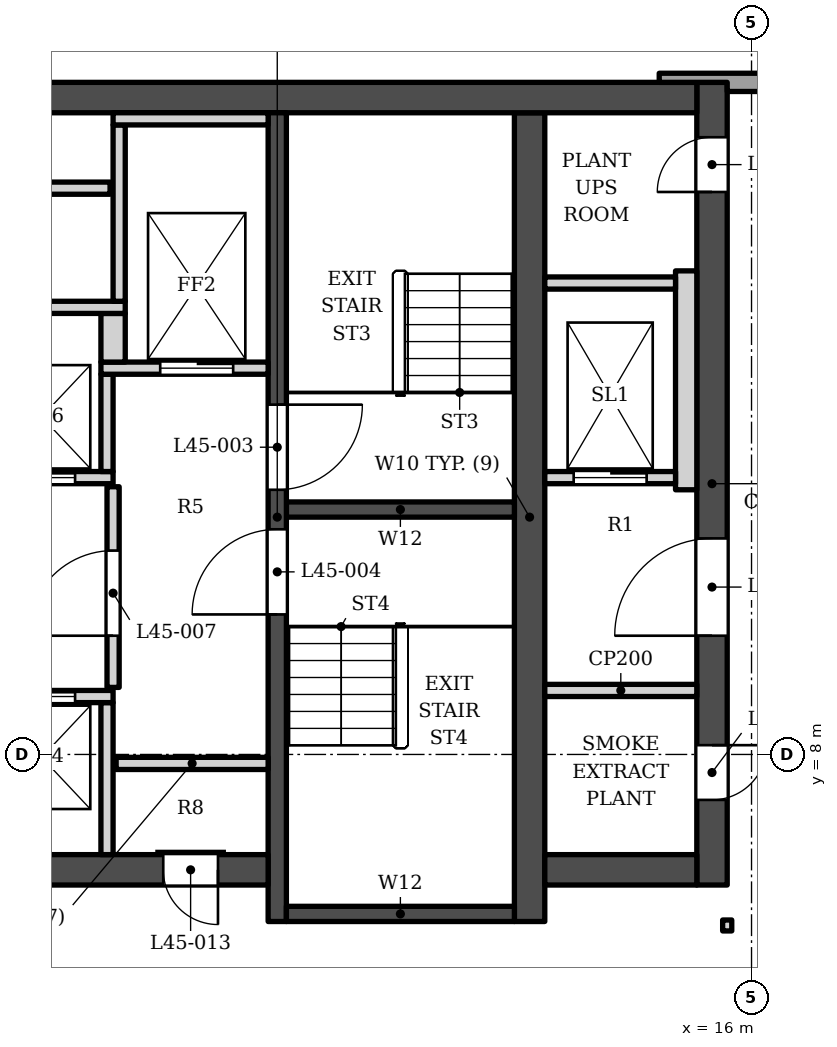
"""IFC4 building model, lengths in metres.
Left out: names, types, materials, properties, quantities, classifications, styles, units other than length and angle.
Written with IfcOpenShell. Run it as: python <this file> out.ifc"""

import sys

from ifc_helpers import new_model, si_unit, direction, frame, frame_2d, origin, place, context, subcontext, project, spatial, polyline, rectangle, outline, extrude, element, fill, save


model = new_model("IFC4")
c1 = context("Model", 3, precision=1e-05, world=origin(), true_north=direction((0.0, 1.0)))
c2 = subcontext(c1, "Body", "Model", "MODEL_VIEW")
j1 = project(units=[si_unit("LENGTHUNIT", "METRE"), si_unit("PLANEANGLEUNIT", "RADIAN")], contexts=[c1])
p1 = place(None, origin())
s1 = spatial("IfcSite", under=j1, at=p1, CompositionType="ELEMENT")
p2 = place(p1, origin())
s2 = spatial("IfcBuilding", under=s1, at=p2, CompositionType="ELEMENT")
p3 = place(p2, frame((0.0, 0.0, 191.4)))
s3 = spatial("IfcBuildingStorey", under=s2, at=p3, CompositionType="ELEMENT", Elevation=191.4)
p4 = place(p3, frame((-15.1, 18.802, 0.0), z_axis=(0.0, 0.0, 1.0), x_axis=(1.0, 0.0, 0.0)))
e1 = element("IfcWall", 1, at=p4, inside=s3, PredefinedType="SHEAR", context=c2, shape_type="SweptSolid", body=[
    extrude(rectangle(XDim=30.2, YDim=0.5, at=frame_2d((15.1, 0.0))), origin(), (0.0, 0.0, 1.0), 5.0),
])
p5 = place(p3, frame((12.35, 5.253, 0.0), z_axis=(0.0, 0.0, 1.0), x_axis=(0.0, 1.0, 0.0)))
e2 = element("IfcWall", 2, at=p5, inside=s3, PredefinedType="SHEAR", context=c2, shape_type="SweptSolid", body=[
    extrude(rectangle(XDim=13.3, YDim=0.5, at=frame_2d((6.65, 0.0))), origin(), (0.0, 0.0, 1.0), 5.0),
])
p6 = place(p3, frame((8.2, 5.253, 0.0), z_axis=(0.0, 0.0, 1.0), x_axis=(0.0, 1.0, 0.0)))
e3 = element("IfcWall", 3, at=p6, inside=s3, PredefinedType="SHEAR", context=c2, shape_type="SweptSolid", body=[
    extrude(rectangle(XDim=13.3, YDim=0.3, at=frame_2d((6.65, 0.0))), origin(), (0.0, 0.0, 1.0), 5.0),
])
p7 = place(p6, frame((7.1, 0.0, 0.0)))
e4 = element("IfcOpeningElement", 4, at=p7, cuts=e3, PredefinedType="OPENING", context=c2, shape_type="SweptSolid", body=[
    extrude(rectangle(XDim=1.4, YDim=2.1, at=frame_2d((0.7, 1.05))), frame((0.0, 0.16, 0.0), z_axis=(0.0, -1.0, 0.0), x_axis=(1.0, 0.0, 0.0)), (0.0, 0.0, 1.0), 0.32),
])
p8 = place(p6, frame((5.05, 0.0, 0.0)))
e5 = element("IfcOpeningElement", 5, at=p8, cuts=e3, PredefinedType="OPENING", context=c2, shape_type="SweptSolid", body=[
    extrude(rectangle(XDim=1.4, YDim=2.1, at=frame_2d((0.7, 1.05))), frame((0.0, 0.16, 0.0), z_axis=(0.0, -1.0, 0.0), x_axis=(1.0, 0.0, 0.0)), (0.0, 0.0, 1.0), 0.32),
])
for number, where, z_axis, x_axis in (
    (6, (8.35, 12.028, 0.0), (0.0, 0.0, 1.0), (1.0, 0.0, 0.0)),
    (7, (8.35, 5.378, 0.0), (0.0, 0.0, 1.0), (1.0, 0.0, 0.0)),
):
    element("IfcWall", number, at=place(p3, frame(where, z_axis=z_axis, x_axis=x_axis)), inside=s3, PredefinedType="SHEAR", context=c2, shape_type="SweptSolid", body=[
        extrude(rectangle(XDim=3.75, YDim=0.25, at=frame_2d((1.875, 0.0))), origin(), (0.0, 0.0, 1.0), 5.0),
    ])
p9 = place(p3, frame((1.0, 6.103, 0.0), z_axis=(0.0, 0.0, 1.0), x_axis=(1.0, 0.0, 0.0)))
e8 = element("IfcWall", 8, at=p9, inside=s3, PredefinedType="SHEAR", context=c2, shape_type="SweptSolid", body=[
    extrude(rectangle(XDim=7.05, YDim=0.5, at=frame_2d((3.525, 0.0))), origin(), (0.0, 0.0, 1.0), 5.0),
])
p10 = place(p9, frame((5.325, 0.0, 0.0)))
e9 = element("IfcOpeningElement", 9, at=p10, cuts=e8, PredefinedType="OPENING", context=c2, shape_type="SweptSolid", body=[
    extrude(rectangle(XDim=0.9, YDim=2.1, at=frame_2d((0.45, 1.05))), frame((0.0, 0.26, 0.0), z_axis=(0.0, -1.0, 0.0), x_axis=(1.0, 0.0, 0.0)), (0.0, 0.0, 1.0), 0.52),
])
p11 = place(p3, frame((12.6, 6.103, 0.0), z_axis=(0.0, 0.0, 1.0), x_axis=(1.0, 0.0, 0.0)))
e10 = element("IfcWall", 10, at=p11, inside=s3, PredefinedType="SHEAR", context=c2, shape_type="SweptSolid", body=[
    extrude(rectangle(XDim=2.5, YDim=0.5, at=frame_2d((1.25, 0.0))), origin(), (0.0, 0.0, 1.0), 5.0),
])
p12 = place(p3, frame((15.35, 5.853, 0.0), z_axis=(0.0, 0.0, 1.0), x_axis=(0.0, 1.0, 0.0)))
e11 = element("IfcWall", 11, at=p12, inside=s3, PredefinedType="SHEAR", context=c2, shape_type="SweptSolid", body=[
    extrude(rectangle(XDim=13.2, YDim=0.5, at=frame_2d((6.6, 0.0))), origin(), (0.0, 0.0, 1.0), 5.0),
])
p13 = place(p12, frame((4.1, 0.0, 0.0)))
e12 = element("IfcOpeningElement", 12, at=p13, cuts=e11, PredefinedType="OPENING", context=c2, shape_type="SweptSolid", body=[
    extrude(rectangle(XDim=1.6, YDim=2.1, at=frame_2d((0.8, 1.05))), frame((0.0, 0.26, 0.0), z_axis=(0.0, -1.0, 0.0), x_axis=(1.0, 0.0, 0.0)), (0.0, 0.0, 1.0), 0.52),
])
p14 = place(p12, frame((1.4, 0.0, 0.0)))
e13 = element("IfcOpeningElement", 13, at=p14, cuts=e11, PredefinedType="OPENING", context=c2, shape_type="SweptSolid", body=[
    extrude(rectangle(XDim=0.9, YDim=2.1, at=frame_2d((0.45, 1.05))), frame((0.0, 0.26, 0.0), z_axis=(0.0, -1.0, 0.0), x_axis=(1.0, 0.0, 0.0)), (0.0, 0.0, 1.0), 0.52),
])
p15 = place(p12, frame((11.397, 0.0, 0.0)))
e14 = element("IfcOpeningElement", 14, at=p15, cuts=e11, PredefinedType="OPENING", context=c2, shape_type="SweptSolid", body=[
    extrude(rectangle(XDim=0.9, YDim=2.1, at=frame_2d((0.45, 1.05))), frame((0.0, 0.26, 0.0), z_axis=(0.0, -1.0, 0.0), x_axis=(1.0, 0.0, 0.0)), (0.0, 0.0, 1.0), 0.52),
])
p16 = place(p3, origin())
e15 = element("IfcWall", 15, at=p16, inside=s3, PredefinedType="ELEMENTEDWALL", context=c2, shape_type="SweptSolid", body=[
    extrude(outline(polyline([(18.082, 19.203), (14.482, 19.203), (14.482, 19.052), (15.6, 19.052), (15.6, 18.903), (18.082, 18.903), (18.082, 19.203)])), origin(), (0.0, 0.0, 1.0), 3.5),
])
for number, where, z_axis, x_axis in (
    (16, (5.4, 6.353, 0.0), (0.0, 0.0, 1.0), (0.0, 1.0, 0.0)),
    (17, (5.55, 7.853, 0.0), (0.0, 0.0, 1.0), (1.0, 0.0, 0.0)),
):
    element("IfcWall", number, at=place(p3, frame(where, z_axis=z_axis, x_axis=x_axis)), inside=s3, PredefinedType="SOLIDWALL", context=c2, shape_type="SweptSolid", body=[
        extrude(rectangle(XDim=2.5, YDim=0.2, at=frame_2d((1.25, 0.0))), origin(), (0.0, 0.0, 1.0), 4.83),
    ])
p17 = place(p3, frame((1.0, 8.953, 0.0), z_axis=(0.0, 0.0, 1.0), x_axis=(1.0, 0.0, 0.0)))
e18 = element("IfcWall", 18, at=p17, inside=s3, PredefinedType="SOLIDWALL", context=c2, shape_type="SweptSolid", body=[
    extrude(rectangle(XDim=4.5, YDim=0.2, at=frame_2d((2.25, 0.0))), origin(), (0.0, 0.0, 1.0), 4.83),
])
p18 = place(p17, frame((0.625, 0.0, 0.0)))
e19 = element("IfcOpeningElement", 19, at=p18, cuts=e18, PredefinedType="OPENING", context=c2, shape_type="SweptSolid", body=[
    extrude(rectangle(XDim=1.1, YDim=2.1, at=frame_2d((0.55, 1.05))), frame((0.0, 0.11, 0.0), z_axis=(0.0, -1.0, 0.0), x_axis=(1.0, 0.0, 0.0)), (0.0, 0.0, 1.0), 0.22),
])
p19 = place(p17, frame((2.775, 0.0, 0.0)))
e20 = element("IfcOpeningElement", 20, at=p19, cuts=e18, PredefinedType="OPENING", context=c2, shape_type="SweptSolid", body=[
    extrude(rectangle(XDim=1.1, YDim=2.1, at=frame_2d((0.55, 1.05))), frame((0.0, 0.11, 0.0), z_axis=(0.0, -1.0, 0.0), x_axis=(1.0, 0.0, 0.0)), (0.0, 0.0, 1.0), 0.22),
])
p20 = place(p3, frame((12.6, 9.052, 0.0), z_axis=(0.0, 0.0, 1.0), x_axis=(1.0, 0.0, 0.0)))
e21 = element("IfcWall", 21, at=p20, inside=s3, PredefinedType="PARTITIONING", context=c2, shape_type="SweptSolid", body=[
    extrude(rectangle(XDim=2.5, YDim=0.2, at=frame_2d((1.25, 0.0))), origin(), (0.0, 0.0, 1.0), 4.83),
])
p21 = place(p3, frame((5.5, 9.103, 0.0), z_axis=(0.0, 0.0, 1.0), x_axis=(0.0, 1.0, 0.0)))
e22 = element("IfcWall", 22, at=p21, inside=s3, PredefinedType="SOLIDWALL", context=c2, shape_type="SweptSolid", body=[
    extrude(rectangle(XDim=3.3, YDim=0.2, at=frame_2d((1.65, 0.0))), origin(), (0.0, 0.0, 1.0), 4.83),
])
p22 = place(p21, frame((0.85, 0.0, 0.0)))
e23 = element("IfcOpeningElement", 23, at=p22, cuts=e22, PredefinedType="OPENING", context=c2, shape_type="SweptSolid", body=[
    extrude(rectangle(XDim=1.4, YDim=2.1, at=frame_2d((0.7, 1.05))), frame((0.0, 0.11, 0.0), z_axis=(0.0, -1.0, 0.0), x_axis=(1.0, 0.0, 0.0)), (0.0, 0.0, 1.0), 0.22),
])
p23 = place(p3, frame((14.925, 12.353, 0.0), z_axis=(0.0, 0.0, 1.0), x_axis=(0.0, 1.0, 0.0)))
e24 = element("IfcWall", 24, at=p23, inside=s3, PredefinedType="SOLIDWALL", context=c2, shape_type="SweptSolid", body=[
    extrude(rectangle(XDim=3.6, YDim=0.35, at=frame_2d((1.8, 0.0))), origin(), (0.0, 0.0, 1.0), 4.83),
])
p24 = place(p3, frame((-1.5, 12.552, 0.0), z_axis=(0.0, 0.0, 1.0), x_axis=(1.0, 0.0, 0.0)))
e25 = element("IfcWall", 25, at=p24, inside=s3, PredefinedType="SOLIDWALL", context=c2, shape_type="SweptSolid", body=[
    extrude(rectangle(XDim=7.0, YDim=0.2, at=frame_2d((3.5, 0.0))), origin(), (0.0, 0.0, 1.0), 4.83),
])
p25 = place(p24, frame((3.075, 0.0, 0.0)))
e26 = element("IfcOpeningElement", 26, at=p25, cuts=e25, PredefinedType="OPENING", context=c2, shape_type="SweptSolid", body=[
    extrude(rectangle(XDim=1.1, YDim=2.1, at=frame_2d((0.55, 1.05))), frame((0.0, 0.11, 0.0), z_axis=(0.0, -1.0, 0.0), x_axis=(1.0, 0.0, 0.0)), (0.0, 0.0, 1.0), 0.22),
])
p26 = place(p24, frame((5.275, 0.0, 0.0)))
e27 = element("IfcOpeningElement", 27, at=p26, cuts=e25, PredefinedType="OPENING", context=c2, shape_type="SweptSolid", body=[
    extrude(rectangle(XDim=1.1, YDim=2.1, at=frame_2d((0.55, 1.05))), frame((0.0, 0.11, 0.0), z_axis=(0.0, -1.0, 0.0), x_axis=(1.0, 0.0, 0.0)), (0.0, 0.0, 1.0), 0.22),
])
p27 = place(p3, frame((12.6, 12.552, 0.0), z_axis=(0.0, 0.0, 1.0), x_axis=(1.0, 0.0, 0.0)))
e28 = element("IfcWall", 28, at=p27, inside=s3, PredefinedType="SOLIDWALL", context=c2, shape_type="SweptSolid", body=[
    extrude(rectangle(XDim=2.15, YDim=0.2, at=frame_2d((1.075, 0.0))), origin(), (0.0, 0.0, 1.0), 4.83),
])
p28 = place(p27, frame((0.475, 0.0, 0.0)))
e29 = element("IfcOpeningElement", 29, at=p28, cuts=e28, PredefinedType="OPENING", context=c2, shape_type="SweptSolid", body=[
    extrude(rectangle(XDim=1.2, YDim=2.1, at=frame_2d((0.6, 1.05))), frame((0.0, 0.11, 0.0), z_axis=(0.0, -1.0, 0.0), x_axis=(1.0, 0.0, 0.0)), (0.0, 0.0, 1.0), 0.22),
])
p29 = place(p3, frame((5.4, 12.653, 0.0), z_axis=(0.0, 0.0, 1.0), x_axis=(0.0, 1.0, 0.0)))
e30 = element("IfcWall", 30, at=p29, inside=s3, PredefinedType="SOLIDWALL", context=c2, shape_type="SweptSolid", body=[
    extrude(rectangle(XDim=1.6, YDim=0.2, at=frame_2d((0.8, 0.0))), origin(), (0.0, 0.0, 1.0), 4.83),
])
p30 = place(p3, frame((5.3, 14.353, 0.0), z_axis=(0.0, 0.0, 1.0), x_axis=(1.0, 0.0, 0.0)))
e31 = element("IfcWall", 31, at=p30, inside=s3, PredefinedType="SOLIDWALL", context=c2, shape_type="SweptSolid", body=[
    extrude(rectangle(XDim=2.75, YDim=0.2, at=frame_2d((1.375, 0.0))), origin(), (0.0, 0.0, 1.0), 4.83),
])
p31 = place(p30, frame((0.975, 0.0, 0.0)))
e32 = element("IfcOpeningElement", 32, at=p31, cuts=e31, PredefinedType="OPENING", context=c2, shape_type="SweptSolid", body=[
    extrude(rectangle(XDim=1.2, YDim=2.1, at=frame_2d((0.6, 1.05))), frame((0.0, 0.11, 0.0), z_axis=(0.0, -1.0, 0.0), x_axis=(1.0, 0.0, 0.0)), (0.0, 0.0, 1.0), 0.22),
])
p32 = place(p3, frame((5.5, 14.453, 0.0), z_axis=(0.0, 0.0, 1.0), x_axis=(0.0, 1.0, 0.0)))
e33 = element("IfcWall", 33, at=p32, inside=s3, PredefinedType="SOLIDWALL", context=c2, shape_type="SweptSolid", body=[
    extrude(rectangle(XDim=0.8, YDim=0.4, at=frame_2d((0.4, 0.0))), origin(), (0.0, 0.0, 1.0), 4.83),
])
p33 = place(p3, frame((-1.5, 15.353, 0.0), z_axis=(0.0, 0.0, 1.0), x_axis=(1.0, 0.0, 0.0)))
e34 = element("IfcWall", 34, at=p33, inside=s3, PredefinedType="SOLIDWALL", context=c2, shape_type="SweptSolid", body=[
    extrude(rectangle(XDim=7.2, YDim=0.2, at=frame_2d((3.6, 0.0))), origin(), (0.0, 0.0, 1.0), 4.83),
])
p34 = place(p3, frame((5.6, 15.453, 0.0), z_axis=(0.0, 0.0, 1.0), x_axis=(0.0, 1.0, 0.0)))
e35 = element("IfcWall", 35, at=p34, inside=s3, PredefinedType="SOLIDWALL", context=c2, shape_type="SweptSolid", body=[
    extrude(rectangle(XDim=2.9, YDim=0.2, at=frame_2d((1.45, 0.0))), origin(), (0.0, 0.0, 1.0), 4.83),
])
p35 = place(p3, frame((12.6, 15.753, 0.0), z_axis=(0.0, 0.0, 1.0), x_axis=(1.0, 0.0, 0.0)))
e36 = element("IfcWall", 36, at=p35, inside=s3, PredefinedType="SOLIDWALL", context=c2, shape_type="SweptSolid", body=[
    extrude(rectangle(XDim=2.15, YDim=0.2, at=frame_2d((1.075, 0.0))), origin(), (0.0, 0.0, 1.0), 4.83),
])
p36 = place(p3, frame((-1.4, 17.312, 0.0), z_axis=(0.0, 0.0, 1.0), x_axis=(1.0, 0.0, 0.0)))
e37 = element("IfcWall", 37, at=p36, inside=s3, PredefinedType="SOLIDWALL", context=c2, shape_type="SweptSolid", body=[
    extrude(rectangle(XDim=6.85, YDim=0.2, at=frame_2d((3.425, 0.0))), origin(), (0.0, 0.0, 1.0), 4.83),
])
p37 = place(p3, frame((5.5, 18.453, 0.0), z_axis=(0.0, 0.0, 1.0), x_axis=(1.0, 0.0, 0.0)))
e38 = element("IfcWall", 38, at=p37, inside=s3, PredefinedType="SOLIDWALL", context=c2, shape_type="SweptSolid", body=[
    extrude(rectangle(XDim=2.55, YDim=0.2, at=frame_2d((1.275, 0.0))), origin(), (0.0, 0.0, 1.0), 4.83),
])
p38 = place(p3, frame((15.6, 5.098, 0.0), z_axis=(0.0, 0.0, 1.0), x_axis=(0.0, 1.0, 0.0)))
e39 = element("IfcWall", 39, at=p38, inside=s3, PredefinedType="PARTITIONING", context=c2, shape_type="SweptSolid", body=[
    extrude(rectangle(XDim=0.18, YDim=0.15, at=frame_2d((0.09, 0.0))), origin(), (0.0, 0.0, 1.0), 4.83),
])
p39 = place(p19, origin())
e40 = element("IfcDoor", 40, at=p39, inside=s3, OperationType="DOUBLE_DOOR_SLIDING", PredefinedType="DOOR", context=c2, shape_type="SweptSolid", body=[
    extrude(rectangle(XDim=1.1, YDim=2.1, at=frame_2d((0.55, 1.05))), frame((0.0, 0.025, 0.0), z_axis=(0.0, -1.0, 0.0), x_axis=(1.0, 0.0, 0.0)), (0.0, 0.0, 1.0), 0.05),
])
fill(e20, e40)
p40 = place(p26, origin())
e41 = element("IfcDoor", 41, at=p40, inside=s3, OperationType="DOUBLE_DOOR_SLIDING", PredefinedType="DOOR", context=c2, shape_type="SweptSolid", body=[
    extrude(rectangle(XDim=1.1, YDim=2.1, at=frame_2d((0.55, 1.05))), frame((0.0, 0.025, 0.0), z_axis=(0.0, -1.0, 0.0), x_axis=(1.0, 0.0, 0.0)), (0.0, 0.0, 1.0), 0.05),
])
fill(e27, e41)
p41 = place(p31, origin())
e42 = element("IfcDoor", 42, at=p41, inside=s3, OperationType="DOUBLE_DOOR_SLIDING", PredefinedType="DOOR", context=c2, shape_type="SweptSolid", body=[
    extrude(rectangle(XDim=1.2, YDim=2.1, at=frame_2d((0.6, 1.05))), frame((0.0, 0.025, 0.0), z_axis=(0.0, -1.0, 0.0), x_axis=(1.0, 0.0, 0.0)), (0.0, 0.0, 1.0), 0.05),
])
fill(e32, e42)
p42 = place(p28, origin())
e43 = element("IfcDoor", 43, at=p42, inside=s3, OperationType="DOUBLE_DOOR_SLIDING", PredefinedType="DOOR", context=c2, shape_type="SweptSolid", body=[
    extrude(rectangle(XDim=1.2, YDim=2.1, at=frame_2d((0.6, 1.05))), frame((0.0, 0.025, 0.0), z_axis=(0.0, -1.0, 0.0), x_axis=(1.0, 0.0, 0.0)), (0.0, 0.0, 1.0), 0.05),
])
fill(e29, e43)
p43 = place(p7, origin())
e44 = element("IfcDoor", 44, at=p43, inside=s3, OperationType="SINGLE_SWING_RIGHT", PredefinedType="DOOR", context=c2, shape_type="SweptSolid", body=[
    extrude(rectangle(XDim=1.4, YDim=2.1, at=frame_2d((0.7, 1.05))), frame((0.0, 0.025, 0.0), z_axis=(0.0, -1.0, 0.0), x_axis=(1.0, 0.0, 0.0)), (0.0, 0.0, 1.0), 0.05),
])
fill(e4, e44)
p44 = place(p8, origin())
e45 = element("IfcDoor", 45, at=p44, inside=s3, OperationType="SINGLE_SWING_LEFT", PredefinedType="DOOR", context=c2, shape_type="SweptSolid", body=[
    extrude(rectangle(XDim=1.4, YDim=2.1, at=frame_2d((0.7, 1.05))), frame((0.0, 0.025, 0.0), z_axis=(0.0, -1.0, 0.0), x_axis=(1.0, 0.0, 0.0)), (0.0, 0.0, 1.0), 0.05),
])
fill(e5, e45)
p45 = place(p22, origin())
e46 = element("IfcDoor", 46, at=p45, inside=s3, OperationType="SINGLE_SWING_LEFT", PredefinedType="DOOR", context=c2, shape_type="SweptSolid", body=[
    extrude(rectangle(XDim=1.4, YDim=2.1, at=frame_2d((0.7, 1.05))), frame((0.0, 0.025, 0.0), z_axis=(0.0, -1.0, 0.0), x_axis=(1.0, 0.0, 0.0)), (0.0, 0.0, 1.0), 0.05),
])
fill(e23, e46)
p46 = place(p10, origin())
e47 = element("IfcDoor", 47, at=p46, inside=s3, OperationType="SINGLE_SWING_RIGHT", PredefinedType="DOOR", context=c2, shape_type="SweptSolid", body=[
    extrude(rectangle(XDim=0.9, YDim=2.1, at=frame_2d((0.45, 1.05))), frame((0.0, 0.025, 0.0), z_axis=(0.0, -1.0, 0.0), x_axis=(1.0, 0.0, 0.0)), (0.0, 0.0, 1.0), 0.05),
])
fill(e9, e47)
p47 = place(p13, origin())
e48 = element("IfcDoor", 48, at=p47, inside=s3, OperationType="DOUBLE_DOOR_SINGLE_SWING", PredefinedType="DOOR", context=c2, shape_type="SweptSolid", body=[
    extrude(rectangle(XDim=1.6, YDim=2.1, at=frame_2d((0.8, 1.05))), frame((0.0, 0.025, 0.0), z_axis=(0.0, -1.0, 0.0), x_axis=(1.0, 0.0, 0.0)), (0.0, 0.0, 1.0), 0.05),
])
fill(e12, e48)
p48 = place(p14, origin())
e49 = element("IfcDoor", 49, at=p48, inside=s3, OperationType="SINGLE_SWING_RIGHT", PredefinedType="DOOR", context=c2, shape_type="SweptSolid", body=[
    extrude(rectangle(XDim=0.9, YDim=2.1, at=frame_2d((0.45, 1.05))), frame((0.0, 0.025, 0.0), z_axis=(0.0, -1.0, 0.0), x_axis=(1.0, 0.0, 0.0)), (0.0, 0.0, 1.0), 0.05),
])
fill(e13, e49)
p49 = place(p15, origin())
e50 = element("IfcDoor", 50, at=p49, inside=s3, OperationType="SINGLE_SWING_LEFT", PredefinedType="DOOR", context=c2, shape_type="SweptSolid", body=[
    extrude(rectangle(XDim=0.9, YDim=2.1, at=frame_2d((0.45, 1.05))), frame((0.0, 0.025, 0.0), z_axis=(0.0, -1.0, 0.0), x_axis=(1.0, 0.0, 0.0)), (0.0, 0.0, 1.0), 0.05),
])
fill(e14, e50)
save(model, sys.argv[1])
